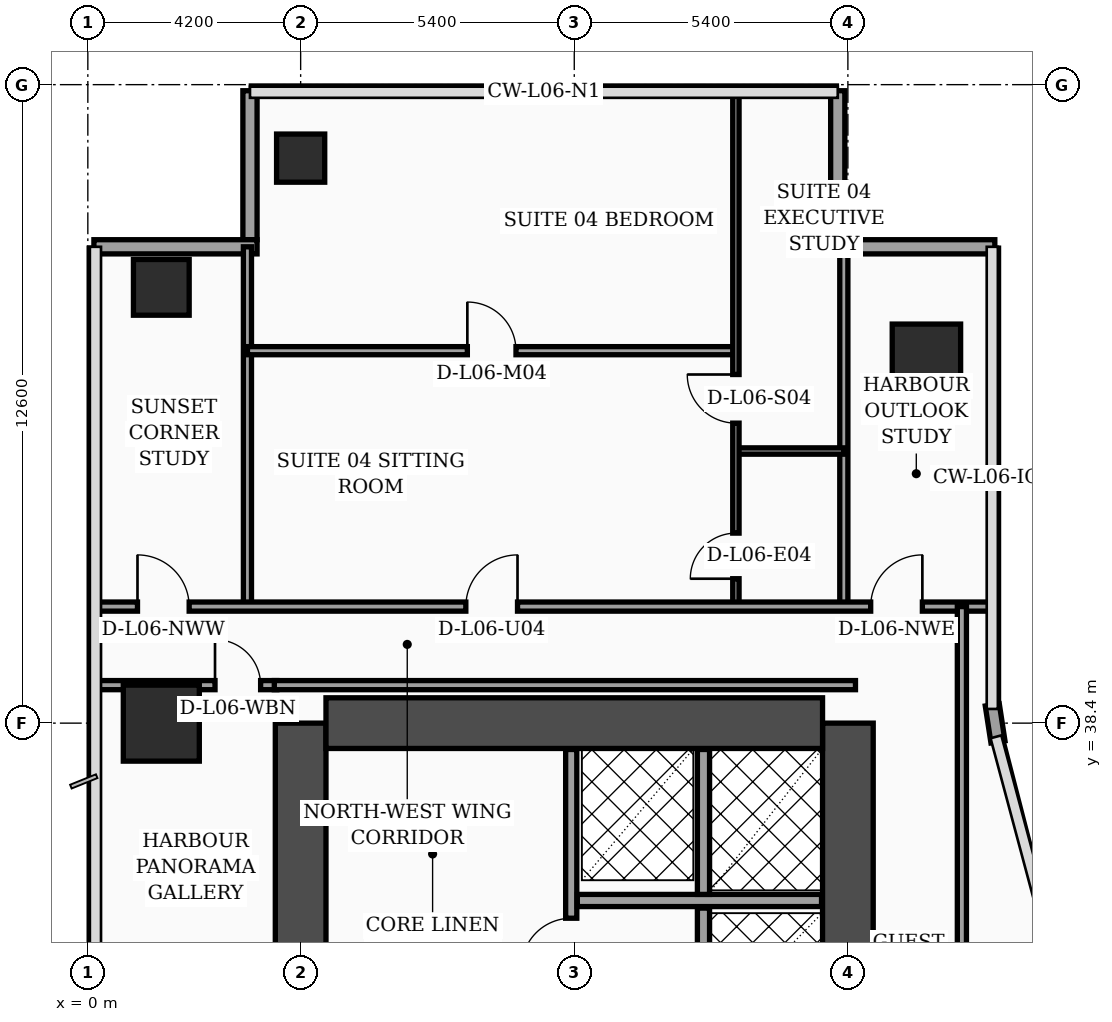
"""IFC4 building model, lengths in metres.
Left out: names, types, materials, properties, quantities, classifications, styles, units other than length and angle.
Written with IfcOpenShell. Run it as: python <this file> out.ifc"""

import sys

from ifc_helpers import new_model, si_unit, direction, frame, frame_2d, origin, origin_2d, place, context, subcontext, project, spatial, rectangle, hollow_rectangle, extrude, element, fill, save


model = new_model("IFC4")
c1 = context("Model", 3, precision=1e-05, world=origin(), true_north=direction((0.0, 1.0)))
c2 = subcontext(c1, "Body", "Model", "MODEL_VIEW")
j1 = project(units=[si_unit("LENGTHUNIT", "METRE"), si_unit("PLANEANGLEUNIT", "RADIAN")], contexts=[c1])
p1 = place(None, origin())
s1 = spatial("IfcSite", under=j1, at=p1, CompositionType="ELEMENT")
p2 = place(p1, origin())
s2 = spatial("IfcBuilding", under=s1, at=p2, CompositionType="ELEMENT")
p3 = place(p2, frame((0.0, 0.0, 30.8)))
s3 = spatial("IfcBuildingStorey", under=s2, at=p3, CompositionType="ELEMENT", Elevation=30.8)
p4 = place(p3, frame((4.2, 16.8, 0.0), z_axis=(0.0, 0.0, 1.0), x_axis=(0.0, 1.0, 0.0)))
e1 = element("IfcWall", 1, at=p4, inside=s3, PredefinedType="SHEAR", context=c2, shape_type="SweptSolid", body=[
    extrude(rectangle(XDim=21.6, YDim=1.0, at=frame_2d((10.8, 0.0))), origin(), (0.0, 0.0, 1.0), 3.56),
])
p5 = place(p3, frame((15.0, 16.8, 0.0), z_axis=(0.0, 0.0, 1.0), x_axis=(0.0, 1.0, 0.0)))
e2 = element("IfcWall", 2, at=p5, inside=s3, PredefinedType="SHEAR", context=c2, shape_type="SweptSolid", body=[
    extrude(rectangle(XDim=21.6, YDim=1.0, at=frame_2d((10.8, 0.0))), origin(), (0.0, 0.0, 1.0), 3.56),
])
p6 = place(p5, frame((8.65, 0.0, 0.0)))
e3 = element("IfcOpeningElement", 3, at=p6, cuts=e2, PredefinedType="OPENING", context=c2, shape_type="SweptSolid", body=[
    extrude(rectangle(XDim=1.1, YDim=2.2, at=frame_2d((0.55, 1.1))), frame((0.0, 0.51, 0.0), z_axis=(0.0, -1.0, 0.0), x_axis=(1.0, 0.0, 0.0)), (0.0, 0.0, 1.0), 1.02),
])
p7 = place(p5, frame((1.25, 0.0, 0.0)))
e4 = element("IfcOpeningElement", 4, at=p7, cuts=e2, PredefinedType="OPENING", context=c2, shape_type="SweptSolid", body=[
    extrude(rectangle(XDim=1.1, YDim=2.2, at=frame_2d((0.55, 1.1))), frame((0.0, 0.51, 0.0), z_axis=(0.0, -1.0, 0.0), x_axis=(1.0, 0.0, 0.0)), (0.0, 0.0, 1.0), 1.02),
])
p8 = place(p5, frame((3.8, 0.0, 0.0)))
e5 = element("IfcOpeningElement", 5, at=p8, cuts=e2, PredefinedType="OPENING", context=c2, shape_type="SweptSolid", body=[
    extrude(rectangle(XDim=1.1, YDim=2.2, at=frame_2d((0.55, 1.1))), frame((0.0, 0.51, 0.0), z_axis=(0.0, -1.0, 0.0), x_axis=(1.0, 0.0, 0.0)), (0.0, 0.0, 1.0), 1.02),
])
p9 = place(p5, frame((6.35, 0.0, 0.0)))
e6 = element("IfcOpeningElement", 6, at=p9, cuts=e2, PredefinedType="OPENING", context=c2, shape_type="SweptSolid", body=[
    extrude(rectangle(XDim=1.1, YDim=2.2, at=frame_2d((0.55, 1.1))), frame((0.0, 0.51, 0.0), z_axis=(0.0, -1.0, 0.0), x_axis=(1.0, 0.0, 0.0)), (0.0, 0.0, 1.0), 1.02),
])
p10 = place(p3, frame((4.7, 38.4, 0.0), z_axis=(0.0, 0.0, 1.0), x_axis=(1.0, 0.0, 0.0)))
e7 = element("IfcWall", 7, at=p10, inside=s3, PredefinedType="SHEAR", context=c2, shape_type="SweptSolid", body=[
    extrude(rectangle(XDim=9.8, YDim=1.0, at=frame_2d((4.9, 0.0))), origin(), (0.0, 0.0, 1.0), 3.56),
])
p11 = place(p3, frame((1.45, 38.4, 0.0), z_axis=(0.0, 0.0, 1.0), x_axis=(1.0, 0.0, 0.0)))
e8 = element("IfcColumn", 8, at=p11, inside=s3, PredefinedType="COLUMN", context=c2, shape_type="SweptSolid", body=[
    extrude(rectangle(XDim=1.5, YDim=1.5, at=origin_2d()), origin(), (0.0, 0.0, 1.0), 3.56),
])
p12 = place(p3, frame((1.45, 47.0, 0.0), z_axis=(0.0, 0.0, 1.0), x_axis=(1.0, 0.0, 0.0)))
e9 = element("IfcColumn", 9, at=p12, inside=s3, PredefinedType="COLUMN", context=c2, shape_type="SweptSolid", body=[
    extrude(hollow_rectangle(XDim=1.1, YDim=1.1, WallThickness=0.045, at=origin_2d()), origin(), (0.0, 0.0, 1.0), 3.56),
])
p13 = place(p3, frame((4.2, 49.55, 0.0), z_axis=(0.0, 0.0, 1.0), x_axis=(1.0, 0.0, 0.0)))
e10 = element("IfcColumn", 10, at=p13, inside=s3, PredefinedType="COLUMN", context=c2, shape_type="SweptSolid", body=[
    extrude(hollow_rectangle(XDim=0.95, YDim=0.95, WallThickness=0.04, at=origin_2d()), origin(), (0.0, 0.0, 1.0), 3.56),
])
p14 = place(p3, frame((16.55, 45.6, 0.0), z_axis=(0.0, 0.0, 1.0), x_axis=(1.0, 0.0, 0.0)))
e11 = element("IfcColumn", 11, at=p14, inside=s3, PredefinedType="COLUMN", context=c2, shape_type="SweptSolid", body=[
    extrude(rectangle(XDim=1.35, YDim=1.35, at=origin_2d()), origin(), (0.0, 0.0, 1.0), 3.56),
])
p15 = place(p3, frame((17.962, 38.03, 0.0), z_axis=(0.0, 0.0, 1.0), x_axis=(-0.15141125477, 0.988470855377, 0.0)))
e12 = element("IfcWall", 12, at=p15, inside=s3, PredefinedType="SOLIDWALL", context=c2, shape_type="SweptSolid", body=[
    extrude(rectangle(XDim=0.739, YDim=0.28, at=frame_2d((0.369, 0.0))), origin(), (0.0, 0.0, 1.0), 3.56),
])
p16 = place(p3, frame((17.9, 47.8, 0.0), z_axis=(0.0, 0.0, 1.0), x_axis=(-1.0, 0.0, 0.0)))
e13 = element("IfcWall", 13, at=p16, inside=s3, PredefinedType="SOLIDWALL", context=c2, shape_type="SweptSolid", body=[
    extrude(rectangle(XDim=3.24, YDim=0.28, at=frame_2d((1.62, 0.0))), origin(), (0.0, 0.0, 1.0), 3.56),
])
p17 = place(p3, frame((14.8, 47.94, 0.0), z_axis=(0.0, 0.0, 1.0), x_axis=(0.0, 1.0, 0.0)))
e14 = element("IfcWall", 14, at=p17, inside=s3, PredefinedType="SOLIDWALL", context=c2, shape_type="SweptSolid", body=[
    extrude(rectangle(XDim=2.94, YDim=0.28, at=frame_2d((1.47, 0.0))), origin(), (0.0, 0.0, 1.0), 3.56),
])
p18 = place(p3, frame((3.2, 50.88, 0.0), z_axis=(0.0, 0.0, 1.0), x_axis=(0.0, -1.0, 0.0)))
e15 = element("IfcWall", 15, at=p18, inside=s3, PredefinedType="SOLIDWALL", context=c2, shape_type="SweptSolid", body=[
    extrude(rectangle(XDim=2.94, YDim=0.28, at=frame_2d((1.47, 0.0))), origin(), (0.0, 0.0, 1.0), 3.04),
])
p19 = place(p3, frame((3.34, 47.8, 0.0), z_axis=(0.0, 0.0, 1.0), x_axis=(-1.0, 0.0, 0.0)))
e16 = element("IfcWall", 16, at=p19, inside=s3, PredefinedType="SOLIDWALL", context=c2, shape_type="SweptSolid", body=[
    extrude(rectangle(XDim=3.22, YDim=0.28, at=frame_2d((1.61, 0.0))), origin(), (0.0, 0.0, 1.0), 3.04),
])
p20 = place(p3, frame((9.54, 32.92, 0.0), z_axis=(0.0, 0.0, 1.0), x_axis=(0.0, 1.0, 0.0)))
e17 = element("IfcWall", 17, at=p20, inside=s3, PredefinedType="SOLIDWALL", context=c2, shape_type="SweptSolid", body=[
    extrude(rectangle(XDim=4.96, YDim=0.22, at=frame_2d((2.48, 0.0))), origin(), (0.0, 0.0, 1.0), 3.56),
])
p21 = place(p20, frame((0.65, 0.0, 0.0)))
e18 = element("IfcOpeningElement", 18, at=p21, cuts=e17, PredefinedType="OPENING", context=c2, shape_type="SweptSolid", body=[
    extrude(rectangle(XDim=0.98, YDim=2.15, at=frame_2d((0.49, 1.075))), frame((0.0, 0.12, 0.0), z_axis=(0.0, -1.0, 0.0), x_axis=(1.0, 0.0, 0.0)), (0.0, 0.0, 1.0), 0.24),
])
p22 = place(p3, frame((12.15, 27.0, 0.0), z_axis=(0.0, 0.0, 1.0), x_axis=(0.0, 1.0, 0.0)))
e19 = element("IfcWall", 19, at=p22, inside=s3, PredefinedType="SOLIDWALL", context=c2, shape_type="SweptSolid", body=[
    extrude(rectangle(XDim=7.75, YDim=0.24, at=frame_2d((3.875, 0.0))), origin(), (0.0, 0.0, 1.0), 3.56),
])
p23 = place(p3, frame((9.66, 34.9, 0.0), z_axis=(0.0, 0.0, 1.0), x_axis=(1.0, 0.0, 0.0)))
e20 = element("IfcWall", 20, at=p23, inside=s3, PredefinedType="SOLIDWALL", context=c2, shape_type="SweptSolid", body=[
    extrude(rectangle(XDim=4.82, YDim=0.24, at=frame_2d((2.41, 0.0))), origin(), (0.0, 0.0, 1.0), 3.56),
])
p24 = place(p3, frame((12.15, 35.02, 0.0), z_axis=(0.0, 0.0, 1.0), x_axis=(0.0, 1.0, 0.0)))
e21 = element("IfcWall", 21, at=p24, inside=s3, PredefinedType="SOLIDWALL", context=c2, shape_type="SweptSolid", body=[
    extrude(rectangle(XDim=2.86, YDim=0.24, at=frame_2d((1.43, 0.0))), origin(), (0.0, 0.0, 1.0), 3.56),
])
p25 = place(p3, frame((0.08, 39.15, 0.0), z_axis=(0.0, 0.0, 1.0), x_axis=(1.0, 0.0, 0.0)))
e22 = element("IfcWall", 22, at=p25, inside=s3, PredefinedType="PARTITIONING", context=c2, shape_type="SweptSolid", body=[
    extrude(rectangle(XDim=3.65, YDim=0.18, at=frame_2d((1.825, 0.0))), origin(), (0.0, 0.0, 1.0), 2.84),
])
p26 = place(p25, frame((2.43, 0.0, 0.0)))
e23 = element("IfcOpeningElement", 23, at=p26, cuts=e22, PredefinedType="OPENING", context=c2, shape_type="SweptSolid", body=[
    extrude(rectangle(XDim=0.9, YDim=2.15, at=frame_2d((0.45, 1.075))), frame((0.0, 0.1, 0.0), z_axis=(0.0, -1.0, 0.0), x_axis=(1.0, 0.0, 0.0)), (0.0, 0.0, 1.0), 0.2),
])
p27 = place(p3, frame((3.15, 40.7, 0.0), z_axis=(0.0, 0.0, 1.0), x_axis=(0.0, 1.0, 0.0)))
e24 = element("IfcWall", 24, at=p27, inside=s3, PredefinedType="PARTITIONING", context=c2, shape_type="SweptSolid", body=[
    extrude(rectangle(XDim=7.1, YDim=0.16, at=frame_2d((3.55, 0.0))), origin(), (0.0, 0.0, 1.0), 3.14),
])
p28 = place(p3, frame((14.92, 40.7, 0.0), z_axis=(0.0, 0.0, 1.0), x_axis=(0.0, 1.0, 0.0)))
e25 = element("IfcWall", 25, at=p28, inside=s3, PredefinedType="PARTITIONING", context=c2, shape_type="SweptSolid", body=[
    extrude(rectangle(XDim=7.1, YDim=0.16, at=frame_2d((3.55, 0.0))), origin(), (0.0, 0.0, 1.0), 3.04),
])
p29 = place(p3, frame((12.79, 43.77, 0.0), z_axis=(0.0, 0.0, 1.0), x_axis=(1.0, 0.0, 0.0)))
e26 = element("IfcWall", 26, at=p29, inside=s3, PredefinedType="PARTITIONING", context=c2, shape_type="SweptSolid", body=[
    extrude(rectangle(XDim=2.13, YDim=0.125, at=frame_2d((1.065, 0.0))), origin(), (0.0, 0.0, 1.0), 3.56),
])
p30 = place(p3, frame((3.15, 45.75, 0.0), z_axis=(0.0, 0.0, 1.0), x_axis=(1.0, 0.0, 0.0)))
e27 = element("IfcWall", 27, at=p30, inside=s3, PredefinedType="PARTITIONING", context=c2, shape_type="SweptSolid", body=[
    extrude(rectangle(XDim=9.64, YDim=0.16, at=frame_2d((4.82, 0.0))), origin(), (0.0, 0.0, 1.0), 2.84),
])
p31 = place(p30, frame((4.34, 0.0, 0.0)))
e28 = element("IfcOpeningElement", 28, at=p31, cuts=e27, PredefinedType="OPENING", context=c2, shape_type="SweptSolid", body=[
    extrude(rectangle(XDim=0.96, YDim=2.2, at=frame_2d((0.48, 1.1))), frame((0.0, 0.09, 0.0), z_axis=(0.0, -1.0, 0.0), x_axis=(1.0, 0.0, 0.0)), (0.0, 0.0, 1.0), 0.18),
])
p32 = place(p3, frame((12.79, 40.7, 0.0), z_axis=(0.0, 0.0, 1.0), x_axis=(0.0, 1.0, 0.0)))
e29 = element("IfcWall", 29, at=p32, inside=s3, PredefinedType="PARTITIONING", context=c2, shape_type="SweptSolid", body=[
    extrude(rectangle(XDim=10.24, YDim=0.125, at=frame_2d((5.12, 0.0))), origin(), (0.0, 0.0, 1.0), 3.04),
])
p33 = place(p32, frame((0.55, 0.0, 0.0)))
e30 = element("IfcOpeningElement", 30, at=p33, cuts=e29, PredefinedType="OPENING", context=c2, shape_type="SweptSolid", body=[
    extrude(rectangle(XDim=0.9, YDim=2.15, at=frame_2d((0.45, 1.075))), frame((0.0, 0.073, 0.0), z_axis=(0.0, -1.0, 0.0), x_axis=(1.0, 0.0, 0.0)), (0.0, 0.0, 1.0), 0.145),
])
p34 = place(p32, frame((3.62, 0.0, 0.0)))
e31 = element("IfcOpeningElement", 31, at=p34, cuts=e29, PredefinedType="OPENING", context=c2, shape_type="SweptSolid", body=[
    extrude(rectangle(XDim=0.96, YDim=2.2, at=frame_2d((0.48, 1.1))), frame((0.0, 0.073, 0.0), z_axis=(0.0, -1.0, 0.0), x_axis=(1.0, 0.0, 0.0)), (0.0, 0.0, 1.0), 0.145),
])
p35 = place(p3, frame((0.08, 40.7, 0.0), z_axis=(0.0, 0.0, 1.0), x_axis=(1.0, 0.0, 0.0)))
e32 = element("IfcWall", 32, at=p35, inside=s3, PredefinedType="PARTITIONING", context=c2, shape_type="SweptSolid", body=[
    extrude(rectangle(XDim=17.77, YDim=0.18, at=frame_2d((8.885, 0.0))), origin(), (0.0, 0.0, 1.0), 2.84),
])
p36 = place(p35, frame((0.9, 0.0, 0.0)))
e33 = element("IfcOpeningElement", 33, at=p36, cuts=e32, PredefinedType="OPENING", context=c2, shape_type="SweptSolid", body=[
    extrude(rectangle(XDim=1.02, YDim=2.2, at=frame_2d((0.51, 1.1))), frame((0.0, 0.1, 0.0), z_axis=(0.0, -1.0, 0.0), x_axis=(1.0, 0.0, 0.0)), (0.0, 0.0, 1.0), 0.2),
])
p37 = place(p35, frame((7.38, 0.0, 0.0)))
e34 = element("IfcOpeningElement", 34, at=p37, cuts=e32, PredefinedType="OPENING", context=c2, shape_type="SweptSolid", body=[
    extrude(rectangle(XDim=1.02, YDim=2.2, at=frame_2d((0.51, 1.1))), frame((0.0, 0.1, 0.0), z_axis=(0.0, -1.0, 0.0), x_axis=(1.0, 0.0, 0.0)), (0.0, 0.0, 1.0), 0.2),
])
p38 = place(p35, frame((15.37, 0.0, 0.0)))
e35 = element("IfcOpeningElement", 35, at=p38, cuts=e32, PredefinedType="OPENING", context=c2, shape_type="SweptSolid", body=[
    extrude(rectangle(XDim=1.02, YDim=2.2, at=frame_2d((0.51, 1.1))), frame((0.0, 0.1, 0.0), z_axis=(0.0, -1.0, 0.0), x_axis=(1.0, 0.0, 0.0)), (0.0, 0.0, 1.0), 0.2),
])
p39 = place(p3, frame((17.25, 24.3, 0.0), z_axis=(0.0, 0.0, 1.0), x_axis=(0.0, 1.0, 0.0)))
e36 = element("IfcWall", 36, at=p39, inside=s3, PredefinedType="PARTITIONING", context=c2, shape_type="SweptSolid", body=[
    extrude(rectangle(XDim=16.4, YDim=0.18, at=frame_2d((8.2, 0.0))), origin(), (0.0, 0.0, 1.0), 2.84),
])
p40 = place(p3, frame((3.68, 39.15, 0.0), z_axis=(0.0, 0.0, 1.0), x_axis=(1.0, 0.0, 0.0)))
e37 = element("IfcWall", 37, at=p40, inside=s3, PredefinedType="PARTITIONING", context=c2, shape_type="SweptSolid", body=[
    extrude(rectangle(XDim=11.47, YDim=0.18, at=frame_2d((5.735, 0.0))), origin(), (0.0, 0.0, 1.0), 2.84),
])
p41 = place(p21, origin())
e38 = element("IfcDoor", 38, at=p41, inside=s3, OperationType="SINGLE_SWING_LEFT", PredefinedType="DOOR", context=c2, shape_type="SweptSolid", body=[
    extrude(rectangle(XDim=0.98, YDim=2.15, at=frame_2d((0.49, 1.075))), frame((0.0, 0.025, 0.0), z_axis=(0.0, -1.0, 0.0), x_axis=(1.0, 0.0, 0.0)), (0.0, 0.0, 1.0), 0.05),
])
fill(e18, e38)
p42 = place(p26, origin())
e39 = element("IfcDoor", 39, at=p42, inside=s3, OperationType="SINGLE_SWING_LEFT", PredefinedType="DOOR", context=c2, shape_type="SweptSolid", body=[
    extrude(rectangle(XDim=0.9, YDim=2.15, at=frame_2d((0.45, 1.075))), frame((0.0, 0.025, 0.0), z_axis=(0.0, -1.0, 0.0), x_axis=(1.0, 0.0, 0.0)), (0.0, 0.0, 1.0), 0.05),
])
fill(e23, e39)
p43 = place(p31, origin())
e40 = element("IfcDoor", 40, at=p43, inside=s3, OperationType="SINGLE_SWING_LEFT", PredefinedType="DOOR", context=c2, shape_type="SweptSolid", body=[
    extrude(rectangle(XDim=0.96, YDim=2.2, at=frame_2d((0.48, 1.1))), frame((0.0, 0.025, 0.0), z_axis=(0.0, -1.0, 0.0), x_axis=(1.0, 0.0, 0.0)), (0.0, 0.0, 1.0), 0.05),
])
fill(e28, e40)
p44 = place(p33, origin())
e41 = element("IfcDoor", 41, at=p44, inside=s3, OperationType="SINGLE_SWING_LEFT", PredefinedType="DOOR", context=c2, shape_type="SweptSolid", body=[
    extrude(rectangle(XDim=0.9, YDim=2.15, at=frame_2d((0.45, 1.075))), frame((0.0, 0.025, 0.0), z_axis=(0.0, -1.0, 0.0), x_axis=(1.0, 0.0, 0.0)), (0.0, 0.0, 1.0), 0.05),
])
fill(e30, e41)
p45 = place(p34, origin())
e42 = element("IfcDoor", 42, at=p45, inside=s3, OperationType="SINGLE_SWING_RIGHT", PredefinedType="DOOR", context=c2, shape_type="SweptSolid", body=[
    extrude(rectangle(XDim=0.96, YDim=2.2, at=frame_2d((0.48, 1.1))), frame((0.0, 0.025, 0.0), z_axis=(0.0, -1.0, 0.0), x_axis=(1.0, 0.0, 0.0)), (0.0, 0.0, 1.0), 0.05),
])
fill(e31, e42)
p46 = place(p36, origin())
e43 = element("IfcDoor", 43, at=p46, inside=s3, OperationType="SINGLE_SWING_LEFT", PredefinedType="DOOR", context=c2, shape_type="SweptSolid", body=[
    extrude(rectangle(XDim=1.02, YDim=2.2, at=frame_2d((0.51, 1.1))), frame((0.0, 0.025, 0.0), z_axis=(0.0, -1.0, 0.0), x_axis=(1.0, 0.0, 0.0)), (0.0, 0.0, 1.0), 0.05),
])
fill(e33, e43)
p47 = place(p37, origin())
e44 = element("IfcDoor", 44, at=p47, inside=s3, OperationType="SINGLE_SWING_RIGHT", PredefinedType="DOOR", context=c2, shape_type="SweptSolid", body=[
    extrude(rectangle(XDim=1.02, YDim=2.2, at=frame_2d((0.51, 1.1))), frame((0.0, 0.025, 0.0), z_axis=(0.0, -1.0, 0.0), x_axis=(1.0, 0.0, 0.0)), (0.0, 0.0, 1.0), 0.05),
])
fill(e34, e44)
p48 = place(p38, origin())
e45 = element("IfcDoor", 45, at=p48, inside=s3, OperationType="SINGLE_SWING_RIGHT", PredefinedType="DOOR", context=c2, shape_type="SweptSolid", body=[
    extrude(rectangle(XDim=1.02, YDim=2.2, at=frame_2d((0.51, 1.1))), frame((0.0, 0.025, 0.0), z_axis=(0.0, -1.0, 0.0), x_axis=(1.0, 0.0, 0.0)), (0.0, 0.0, 1.0), 0.05),
])
fill(e35, e45)
save(model, sys.argv[1])
